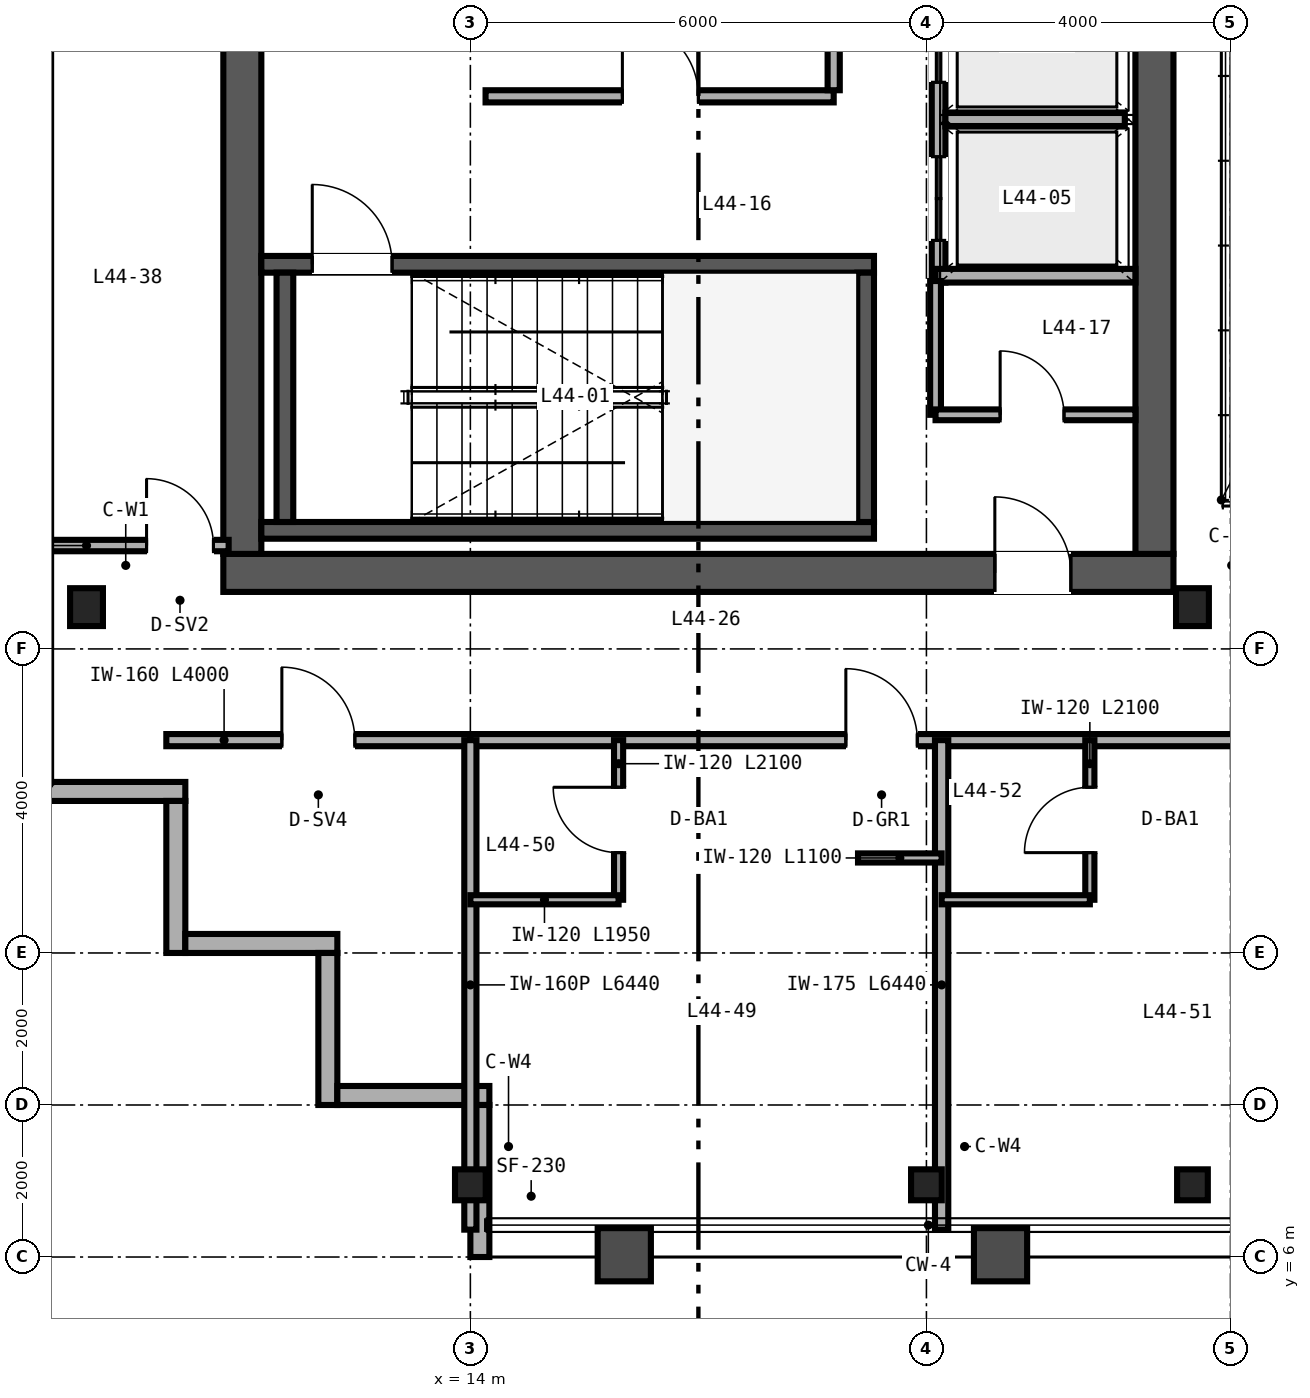
"""IFC4 building model, lengths in metres.
Left out: names, types, materials, properties, quantities, classifications, styles, units other than length and angle.
Written with IfcOpenShell. Run it as: python <this file> out.ifc"""

import sys

from ifc_helpers import new_model, si_unit, direction, frame, frame_2d, origin, origin_2d, place, context, subcontext, project, spatial, rectangle, i_section, extrude, source, transform, mapped, element, fill, save


model = new_model("IFC4")
c1 = context("Model", 3, precision=1e-05, world=origin(), true_north=direction((0.0, 1.0)))
c2 = subcontext(c1, "Body", "Model", "MODEL_VIEW")
j1 = project(units=[si_unit("LENGTHUNIT", "METRE"), si_unit("PLANEANGLEUNIT", "RADIAN")], contexts=[c1])
p1 = place(None, origin())
s1 = spatial("IfcSite", under=j1, at=p1, CompositionType="ELEMENT")
p2 = place(p1, origin())
s2 = spatial("IfcBuilding", under=s1, at=p2, CompositionType="ELEMENT")
p3 = place(p2, frame((0.0, 0.0, 177.6)))
s3 = spatial("IfcBuildingStorey", under=s2, at=p3, CompositionType="ELEMENT", Elevation=177.6)
p4 = place(p3, frame((10.75, 15.0, 0.0), z_axis=(0.0, 0.0, 1.0), x_axis=(1.0, 0.0, 0.0)))
e1 = element("IfcWall", 1, at=p4, inside=s3, PredefinedType="SHEAR", context=c2, shape_type="SweptSolid", body=[
    extrude(rectangle(XDim=12.5, YDim=0.5, at=frame_2d((6.25, 0.0))), origin(), (0.0, 0.0, 1.0), 3.37),
])
p5 = place(p4, frame((10.15, 0.0, 0.0)))
e2 = element("IfcOpeningElement", 2, at=p5, cuts=e1, PredefinedType="OPENING", context=c2, shape_type="SweptSolid", body=[
    extrude(rectangle(XDim=1.0, YDim=2.15, at=frame_2d((0.5, 1.075))), frame((0.0, 0.26, 0.0), z_axis=(0.0, -1.0, 0.0), x_axis=(1.0, 0.0, 0.0)), (0.0, 0.0, 1.0), 0.52),
])
for number, where, z_axis, x_axis in (
    (3, (11.0, 15.25, 0.0), (0.0, 0.0, 1.0), (0.0, 1.0, 0.0)),
    (4, (23.0, 15.25, 0.0), (0.0, 0.0, 1.0), (0.0, 1.0, 0.0)),
):
    element("IfcWall", number, at=place(p3, frame(where, z_axis=z_axis, x_axis=x_axis)), inside=s3, PredefinedType="SHEAR", context=c2, shape_type="SweptSolid", body=[
        extrude(rectangle(XDim=21.5, YDim=0.5, at=frame_2d((10.75, 0.0))), origin(), (0.0, 0.0, 1.0), 3.37),
    ])
p6 = place(p3, frame((11.25, 15.56, 0.0), z_axis=(0.0, 0.0, 1.0), x_axis=(1.0, 0.0, 0.0)))
e5 = element("IfcWall", 5, at=p6, inside=s3, PredefinedType="SHEAR", context=c2, shape_type="SweptSolid", body=[
    extrude(rectangle(XDim=8.06, YDim=0.22, at=frame_2d((4.03, 0.0))), origin(), (0.0, 0.0, 1.0), 3.4),
])
p7 = place(p3, frame((11.25, 19.06, 0.0), z_axis=(0.0, 0.0, 1.0), x_axis=(1.0, 0.0, 0.0)))
e6 = element("IfcWall", 6, at=p7, inside=s3, PredefinedType="SHEAR", context=c2, shape_type="SweptSolid", body=[
    extrude(rectangle(XDim=8.06, YDim=0.22, at=frame_2d((4.03, 0.0))), origin(), (0.0, 0.0, 1.0), 3.4),
])
p8 = place(p7, frame((0.67, 0.0, 0.0)))
e7 = element("IfcOpeningElement", 7, at=p8, cuts=e6, PredefinedType="OPENING", context=c2, shape_type="SweptSolid", body=[
    extrude(rectangle(XDim=1.05, YDim=2.15, at=frame_2d((0.525, 1.075))), frame((0.0, 0.12, 0.0), z_axis=(0.0, -1.0, 0.0), x_axis=(1.0, 0.0, 0.0)), (0.0, 0.0, 1.0), 0.24),
])
for number, where, z_axis, x_axis in (
    (8, (11.56, 15.67, 0.0), (0.0, 0.0, 1.0), (0.0, 1.0, 0.0)),
    (9, (19.2, 15.67, 0.0), (0.0, 0.0, 1.0), (0.0, 1.0, 0.0)),
):
    element("IfcWall", number, at=place(p3, frame(where, z_axis=z_axis, x_axis=x_axis)), inside=s3, PredefinedType="SHEAR", context=c2, shape_type="SweptSolid", body=[
        extrude(rectangle(XDim=3.28, YDim=0.22, at=frame_2d((1.64, 0.0))), origin(), (0.0, 0.0, 1.0), 3.4),
    ])
m1 = source(origin(), c2, "Body", "SweptSolid", [
    extrude(i_section(OverallWidth=0.432, OverallDepth=0.498, WebThickness=0.056, FlangeThickness=0.089, FilletRadius=0.025, at=origin_2d()), origin(), (0.0, 0.0, 1.0), 3.37),
])
for number, where, z_axis, x_axis in (
    (10, (8.95, 14.55, 0.0), (0.0, 0.0, 1.0), (1.0, 0.0, 0.0)),
    (11, (23.5, 14.55, 0.0), (0.0, 0.0, 1.0), (1.0, 0.0, 0.0)),
):
    element("IfcColumn", number, at=place(p3, frame(where, z_axis=z_axis, x_axis=x_axis)), inside=s3, PredefinedType="COLUMN", context=c2, shape_type="MappedRepresentation", body=[
        mapped(m1, transform((0.0, 0.0, 0.0), scale=1.0)),
    ])
m2 = source(origin(), c2, "Body", "SweptSolid", [
    extrude(i_section(OverallWidth=0.404, OverallDepth=0.407, WebThickness=0.027, FlangeThickness=0.044, FilletRadius=0.025, at=origin_2d()), origin(), (0.0, 0.0, 1.0), 3.37),
])
for number, where, z_axis, x_axis in (
    (12, (14.0, 6.95, 0.0), (0.0, 0.0, 1.0), (1.0, 0.0, 0.0)),
    (13, (20.0, 6.95, 0.0), (0.0, 0.0, 1.0), (1.0, 0.0, 0.0)),
    (14, (23.5, 6.95, 0.0), (0.0, 0.0, 1.0), (1.0, 0.0, 0.0)),
):
    element("IfcColumn", number, at=place(p3, frame(where, z_axis=z_axis, x_axis=x_axis)), inside=s3, PredefinedType="COLUMN", context=c2, shape_type="MappedRepresentation", body=[
        mapped(m2, transform((0.0, 0.0, 0.0), scale=1.0)),
    ])
p9 = place(p3, frame((8.0, 12.125, 0.0), z_axis=(0.0, 0.0, 1.0), x_axis=(1.0, 0.0, 0.0)))
e15 = element("IfcWall", 15, at=p9, inside=s3, PredefinedType="SOLIDWALL", context=c2, shape_type="SweptSolid", body=[
    extrude(rectangle(XDim=2.25, YDim=0.25, at=frame_2d((1.125, 0.0))), origin(), (0.0, 0.0, 1.0), 3.37),
])
for number, where, z_axis, x_axis in (
    (16, (10.125, 12.0, 0.0), (0.0, 0.0, 1.0), (0.0, -1.0, 0.0)),
    (17, (10.25, 10.125, 0.0), (0.0, 0.0, 1.0), (1.0, 0.0, 0.0)),
    (18, (12.125, 10.0, 0.0), (0.0, 0.0, 1.0), (0.0, -1.0, 0.0)),
    (19, (12.25, 8.125, 0.0), (0.0, 0.0, 1.0), (1.0, 0.0, 0.0)),
):
    element("IfcWall", number, at=place(p3, frame(where, z_axis=z_axis, x_axis=x_axis)), inside=s3, PredefinedType="SOLIDWALL", context=c2, shape_type="SweptSolid", body=[
        extrude(rectangle(XDim=2.0, YDim=0.25, at=frame_2d((1.0, 0.0))), origin(), (0.0, 0.0, 1.0), 3.37),
    ])
p10 = place(p3, frame((14.125, 8.0, 0.0), z_axis=(0.0, 0.0, 1.0), x_axis=(0.0, -1.0, 0.0)))
e20 = element("IfcWall", 20, at=p10, inside=s3, PredefinedType="SOLIDWALL", context=c2, shape_type="SweptSolid", body=[
    extrude(rectangle(XDim=2.0, YDim=0.25, at=frame_2d((1.0, 0.0))), origin(), (0.0, 0.0, 1.0), 2.677),
])
p11 = place(p3, frame((20.16, 18.82, 0.0), z_axis=(0.0, 0.0, 1.0), x_axis=(0.0, 1.0, 0.0)))
e21 = element("IfcWall", 21, at=p11, inside=s3, PredefinedType="SOLIDWALL", context=c2, shape_type="SweptSolid", body=[
    extrude(rectangle(XDim=6.32, YDim=0.18, at=frame_2d((3.16, 0.0))), origin(), (0.0, 0.0, 1.0), 2.47),
])
p12 = place(p11, frame((0.555, 0.0, 0.0)))
e22 = element("IfcOpeningElement", 22, at=p12, cuts=e21, PredefinedType="OPENING", context=c2, shape_type="SweptSolid", body=[
    extrude(rectangle(XDim=1.1, YDim=2.2, at=frame_2d((0.55, 1.1))), frame((0.0, 0.1, 0.0), z_axis=(0.0, -1.0, 0.0), x_axis=(1.0, 0.0, 0.0)), (0.0, 0.0, 1.0), 0.2),
])
p13 = place(p11, frame((2.635, 0.0, 0.0)))
e23 = element("IfcOpeningElement", 23, at=p13, cuts=e21, PredefinedType="OPENING", context=c2, shape_type="SweptSolid", body=[
    extrude(rectangle(XDim=1.1, YDim=2.2, at=frame_2d((0.55, 1.1))), frame((0.0, 0.1, 0.0), z_axis=(0.0, -1.0, 0.0), x_axis=(1.0, 0.0, 0.0)), (0.0, 0.0, 1.0), 0.2),
])
p14 = place(p11, frame((4.69, 0.0, 0.0)))
e24 = element("IfcOpeningElement", 24, at=p14, cuts=e21, PredefinedType="OPENING", context=c2, shape_type="SweptSolid", body=[
    extrude(rectangle(XDim=1.1, YDim=2.2, at=frame_2d((0.55, 1.1))), frame((0.0, 0.1, 0.0), z_axis=(0.0, -1.0, 0.0), x_axis=(1.0, 0.0, 0.0)), (0.0, 0.0, 1.0), 0.2),
])
p15 = place(p3, frame((20.12, 18.91, 0.0), z_axis=(0.0, 0.0, 1.0), x_axis=(1.0, 0.0, 0.0)))
e25 = element("IfcWall", 25, at=p15, inside=s3, PredefinedType="SOLIDWALL", context=c2, shape_type="SweptSolid", body=[
    extrude(rectangle(XDim=2.63, YDim=0.18, at=frame_2d((1.315, 0.0))), origin(), (0.0, 0.0, 1.0), 3.37),
])
p16 = place(p3, frame((20.25, 20.965, 0.0), z_axis=(0.0, 0.0, 1.0), x_axis=(1.0, 0.0, 0.0)))
e26 = element("IfcWall", 26, at=p16, inside=s3, PredefinedType="SOLIDWALL", context=c2, shape_type="SweptSolid", body=[
    extrude(rectangle(XDim=2.36, YDim=0.18, at=frame_2d((1.18, 0.0))), origin(), (0.0, 0.0, 1.0), 2.47),
])
p17 = place(p3, frame((14.2, 21.27, 0.0), z_axis=(0.0, 0.0, 1.0), x_axis=(1.0, 0.0, 0.0)))
e27 = element("IfcWall", 27, at=p17, inside=s3, PredefinedType="PARTITIONING", context=c2, shape_type="SweptSolid", body=[
    extrude(rectangle(XDim=4.58, YDim=0.16, at=frame_2d((2.29, 0.0))), origin(), (0.0, 0.0, 1.0), 3.37),
])
p18 = place(p17, frame((1.8, 0.0, 0.0)))
e28 = element("IfcOpeningElement", 28, at=p18, cuts=e27, PredefinedType="OPENING", context=c2, shape_type="SweptSolid", body=[
    extrude(rectangle(XDim=1.0, YDim=2.15, at=frame_2d((0.5, 1.075))), frame((0.0, 0.09, 0.0), z_axis=(0.0, -1.0, 0.0), x_axis=(1.0, 0.0, 0.0)), (0.0, 0.0, 1.0), 0.18),
])
p19 = place(p3, frame((18.78, 21.35, 0.0), z_axis=(0.0, 0.0, 1.0), x_axis=(0.0, 1.0, 0.0)))
e29 = element("IfcWall", 29, at=p19, inside=s3, PredefinedType="PARTITIONING", context=c2, shape_type="SweptSolid", body=[
    extrude(rectangle(XDim=3.81, YDim=0.16, at=frame_2d((1.905, 0.0))), origin(), (0.0, 0.0, 1.0), 3.37),
])
p20 = place(p3, frame((20.12, 17.08, 0.0), z_axis=(0.0, 0.0, 1.0), x_axis=(0.0, 1.0, 0.0)))
e30 = element("IfcWall", 30, at=p20, inside=s3, PredefinedType="PARTITIONING", context=c2, shape_type="SweptSolid", body=[
    extrude(rectangle(XDim=1.76, YDim=0.142, at=frame_2d((0.88, 0.0))), origin(), (0.0, 0.0, 1.0), 3.37),
])
p21 = place(p3, frame((20.12, 17.08, 0.0), z_axis=(0.0, 0.0, 1.0), x_axis=(1.0, 0.0, 0.0)))
e31 = element("IfcWall", 31, at=p21, inside=s3, PredefinedType="PARTITIONING", context=c2, shape_type="SweptSolid", body=[
    extrude(rectangle(XDim=2.63, YDim=0.142, at=frame_2d((1.315, 0.0))), origin(), (0.0, 0.0, 1.0), 3.37),
])
p22 = place(p21, frame((0.85, 0.0, 0.0)))
e32 = element("IfcOpeningElement", 32, at=p22, cuts=e31, PredefinedType="OPENING", context=c2, shape_type="SweptSolid", body=[
    extrude(rectangle(XDim=0.84, YDim=2.1, at=frame_2d((0.42, 1.05))), frame((0.0, 0.081, 0.0), z_axis=(0.0, -1.0, 0.0), x_axis=(1.0, 0.0, 0.0)), (0.0, 0.0, 1.0), 0.162),
])
p23 = place(p3, frame((8.16, 15.36, 0.0), z_axis=(0.0, 0.0, 1.0), x_axis=(1.0, 0.0, 0.0)))
e33 = element("IfcWall", 33, at=p23, inside=s3, PredefinedType="PARTITIONING", context=c2, shape_type="SweptSolid", body=[
    extrude(rectangle(XDim=2.66, YDim=0.15, at=frame_2d((1.33, 0.0))), origin(), (0.0, 0.0, 1.0), 2.591),
])
p24 = place(p23, frame((1.58, 0.0, 0.0)))
e34 = element("IfcOpeningElement", 34, at=p24, cuts=e33, PredefinedType="OPENING", context=c2, shape_type="SweptSolid", body=[
    extrude(rectangle(XDim=0.88, YDim=2.15, at=frame_2d((0.44, 1.075))), frame((0.0, 0.085, 0.0), z_axis=(0.0, -1.0, 0.0), x_axis=(1.0, 0.0, 0.0)), (0.0, 0.0, 1.0), 0.17),
])
p25 = place(p3, frame((10.0, 12.8, 0.0), z_axis=(0.0, 0.0, 1.0), x_axis=(1.0, 0.0, 0.0)))
e35 = element("IfcWall", 35, at=p25, inside=s3, PredefinedType="PARTITIONING", context=c2, shape_type="SweptSolid", body=[
    extrude(rectangle(XDim=4.0, YDim=0.16, at=frame_2d((2.0, 0.0))), origin(), (0.0, 0.0, 1.0), 3.37),
])
p26 = place(p25, frame((1.52, 0.0, 0.0)))
e36 = element("IfcOpeningElement", 36, at=p26, cuts=e35, PredefinedType="OPENING", context=c2, shape_type="SweptSolid", body=[
    extrude(rectangle(XDim=0.96, YDim=2.15, at=frame_2d((0.48, 1.075))), frame((0.0, 0.09, 0.0), z_axis=(0.0, -1.0, 0.0), x_axis=(1.0, 0.0, 0.0)), (0.0, 0.0, 1.0), 0.18),
])
p27 = place(p3, frame((14.0, 12.8, 0.0), z_axis=(0.0, 0.0, 1.0), x_axis=(1.0, 0.0, 0.0)))
e37 = element("IfcWall", 37, at=p27, inside=s3, PredefinedType="PARTITIONING", context=c2, shape_type="SweptSolid", body=[
    extrude(rectangle(XDim=12.0, YDim=0.16, at=frame_2d((6.0, 0.0))), origin(), (0.0, 0.0, 1.0), 2.913),
])
p28 = place(p27, frame((4.94, 0.0, 0.0)))
e38 = element("IfcOpeningElement", 38, at=p28, cuts=e37, PredefinedType="OPENING", context=c2, shape_type="SweptSolid", body=[
    extrude(rectangle(XDim=0.94, YDim=2.15, at=frame_2d((0.47, 1.075))), frame((0.0, 0.09, 0.0), z_axis=(0.0, -1.0, 0.0), x_axis=(1.0, 0.0, 0.0)), (0.0, 0.0, 1.0), 0.18),
])
p29 = place(p27, frame((10.74, 0.0, 0.0)))
e39 = element("IfcOpeningElement", 39, at=p29, cuts=e37, PredefinedType="OPENING", context=c2, shape_type="SweptSolid", body=[
    extrude(rectangle(XDim=0.94, YDim=2.15, at=frame_2d((0.47, 1.075))), frame((0.0, 0.09, 0.0), z_axis=(0.0, -1.0, 0.0), x_axis=(1.0, 0.0, 0.0)), (0.0, 0.0, 1.0), 0.18),
])
p30 = place(p3, frame((14.0, 6.36, 0.0), z_axis=(0.0, 0.0, 1.0), x_axis=(0.0, 1.0, 0.0)))
e40 = element("IfcWall", 40, at=p30, inside=s3, PredefinedType="PARTITIONING", context=c2, shape_type="SweptSolid", body=[
    extrude(rectangle(XDim=6.44, YDim=0.16, at=frame_2d((3.22, 0.0))), origin(), (0.0, 0.0, 1.0), 2.677),
])
p31 = place(p3, frame((20.2, 6.36, 0.0), z_axis=(0.0, 0.0, 1.0), x_axis=(0.0, 1.0, 0.0)))
e41 = element("IfcWall", 41, at=p31, inside=s3, PredefinedType="PARTITIONING", context=c2, shape_type="SweptSolid", body=[
    extrude(rectangle(XDim=6.44, YDim=0.175, at=frame_2d((3.22, 0.0))), origin(), (0.0, 0.0, 1.0), 2.677),
])
p32 = place(p3, frame((15.95, 10.7, 0.0), z_axis=(0.0, 0.0, 1.0), x_axis=(0.0, 1.0, 0.0)))
e42 = element("IfcWall", 42, at=p32, inside=s3, PredefinedType="PARTITIONING", context=c2, shape_type="SweptSolid", body=[
    extrude(rectangle(XDim=2.1, YDim=0.12, at=frame_2d((1.05, 0.0))), origin(), (0.0, 0.0, 1.0), 3.37),
])
p33 = place(p32, frame((0.62, 0.0, 0.0)))
e43 = element("IfcOpeningElement", 43, at=p33, cuts=e42, PredefinedType="OPENING", context=c2, shape_type="SweptSolid", body=[
    extrude(rectangle(XDim=0.86, YDim=2.1, at=frame_2d((0.43, 1.05))), frame((0.0, 0.07, 0.0), z_axis=(0.0, -1.0, 0.0), x_axis=(1.0, 0.0, 0.0)), (0.0, 0.0, 1.0), 0.14),
])
p34 = place(p3, frame((14.0, 10.7, 0.0), z_axis=(0.0, 0.0, 1.0), x_axis=(1.0, 0.0, 0.0)))
e44 = element("IfcWall", 44, at=p34, inside=s3, PredefinedType="PARTITIONING", context=c2, shape_type="SweptSolid", body=[
    extrude(rectangle(XDim=1.95, YDim=0.12, at=frame_2d((0.975, 0.0))), origin(), (0.0, 0.0, 1.0), 3.37),
])
p35 = place(p3, frame((19.1, 11.25, 0.0), z_axis=(0.0, 0.0, 1.0), x_axis=(1.0, 0.0, 0.0)))
e45 = element("IfcWall", 45, at=p35, inside=s3, PredefinedType="PARTITIONING", context=c2, shape_type="SweptSolid", body=[
    extrude(rectangle(XDim=1.1, YDim=0.12, at=frame_2d((0.55, 0.0))), origin(), (0.0, 0.0, 1.0), 3.37),
])
p36 = place(p3, frame((22.15, 10.7, 0.0), z_axis=(0.0, 0.0, 1.0), x_axis=(0.0, 1.0, 0.0)))
e46 = element("IfcWall", 46, at=p36, inside=s3, PredefinedType="PARTITIONING", context=c2, shape_type="SweptSolid", body=[
    extrude(rectangle(XDim=2.1, YDim=0.12, at=frame_2d((1.05, 0.0))), origin(), (0.0, 0.0, 1.0), 3.37),
])
p37 = place(p36, frame((0.62, 0.0, 0.0)))
e47 = element("IfcOpeningElement", 47, at=p37, cuts=e46, PredefinedType="OPENING", context=c2, shape_type="SweptSolid", body=[
    extrude(rectangle(XDim=0.86, YDim=2.1, at=frame_2d((0.43, 1.05))), frame((0.0, 0.07, 0.0), z_axis=(0.0, -1.0, 0.0), x_axis=(1.0, 0.0, 0.0)), (0.0, 0.0, 1.0), 0.14),
])
p38 = place(p3, frame((20.2, 10.7, 0.0), z_axis=(0.0, 0.0, 1.0), x_axis=(1.0, 0.0, 0.0)))
e48 = element("IfcWall", 48, at=p38, inside=s3, PredefinedType="PARTITIONING", context=c2, shape_type="SweptSolid", body=[
    extrude(rectangle(XDim=1.95, YDim=0.12, at=frame_2d((0.975, 0.0))), origin(), (0.0, 0.0, 1.0), 3.37),
])
m3 = source(origin(), c2, "Body", "SweptSolid", [
    extrude(rectangle(XDim=1.05, YDim=2.15, at=frame_2d((0.525, 1.075))), frame((0.0, 0.025, 0.0), z_axis=(0.0, -1.0, 0.0), x_axis=(1.0, 0.0, 0.0)), (0.0, 0.0, 1.0), 0.05),
])
p39 = place(p8, origin())
e49 = element("IfcDoor", 49, at=p39, inside=s3, OperationType="SINGLE_SWING_LEFT", PredefinedType="DOOR", context=c2, shape_type="MappedRepresentation", body=[
    mapped(m3, transform((0.0, 0.0, 0.0), scale=1.0)),
])
fill(e7, e49)
m4 = source(origin(), c2, "Body", "SweptSolid", [
    extrude(rectangle(XDim=1.1, YDim=2.2, at=frame_2d((0.55, 1.1))), frame((0.0, 0.025, 0.0), z_axis=(0.0, -1.0, 0.0), x_axis=(1.0, 0.0, 0.0)), (0.0, 0.0, 1.0), 0.05),
])
p40 = place(p12, origin())
e50 = element("IfcDoor", 50, at=p40, inside=s3, OperationType="DOUBLE_DOOR_SLIDING", PredefinedType="DOOR", context=c2, shape_type="MappedRepresentation", body=[
    mapped(m4, transform((0.0, 0.0, 0.0), scale=1.0)),
])
fill(e22, e50)
p41 = place(p13, origin())
e51 = element("IfcDoor", 51, at=p41, inside=s3, OperationType="DOUBLE_DOOR_SLIDING", PredefinedType="DOOR", context=c2, shape_type="MappedRepresentation", body=[
    mapped(m4, transform((0.0, 0.0, 0.0), scale=1.0)),
])
fill(e23, e51)
m5 = source(origin(), c2, "Body", "SweptSolid", [
    extrude(rectangle(XDim=1.0, YDim=2.15, at=frame_2d((0.5, 1.075))), frame((0.0, 0.025, 0.0), z_axis=(0.0, -1.0, 0.0), x_axis=(1.0, 0.0, 0.0)), (0.0, 0.0, 1.0), 0.05),
])
p42 = place(p18, origin())
e52 = element("IfcDoor", 52, at=p42, inside=s3, OperationType="SINGLE_SWING_LEFT", PredefinedType="DOOR", context=c2, shape_type="MappedRepresentation", body=[
    mapped(m5, transform((0.0, 0.0, 0.0), scale=1.0)),
])
fill(e28, e52)
m6 = source(origin(), c2, "Body", "SweptSolid", [
    extrude(rectangle(XDim=0.84, YDim=2.1, at=frame_2d((0.42, 1.05))), frame((0.0, 0.025, 0.0), z_axis=(0.0, -1.0, 0.0), x_axis=(1.0, 0.0, 0.0)), (0.0, 0.0, 1.0), 0.05),
])
p43 = place(p22, origin())
e53 = element("IfcDoor", 53, at=p43, inside=s3, OperationType="SINGLE_SWING_LEFT", PredefinedType="DOOR", context=c2, shape_type="MappedRepresentation", body=[
    mapped(m6, transform((0.0, 0.0, 0.0), scale=1.0)),
])
fill(e32, e53)
p44 = place(p5, origin())
e54 = element("IfcDoor", 54, at=p44, inside=s3, OperationType="SINGLE_SWING_LEFT", PredefinedType="DOOR", context=c2, shape_type="MappedRepresentation", body=[
    mapped(m5, transform((0.0, 0.0, 0.0), scale=1.0)),
])
fill(e2, e54)
m7 = source(origin(), c2, "Body", "SweptSolid", [
    extrude(rectangle(XDim=0.88, YDim=2.15, at=frame_2d((0.44, 1.075))), frame((0.0, 0.025, 0.0), z_axis=(0.0, -1.0, 0.0), x_axis=(1.0, 0.0, 0.0)), (0.0, 0.0, 1.0), 0.05),
])
p45 = place(p24, origin())
e55 = element("IfcDoor", 55, at=p45, inside=s3, OperationType="SINGLE_SWING_LEFT", PredefinedType="DOOR", context=c2, shape_type="MappedRepresentation", body=[
    mapped(m7, transform((0.0, 0.0, 0.0), scale=1.0)),
])
fill(e34, e55)
m8 = source(origin(), c2, "Body", "SweptSolid", [
    extrude(rectangle(XDim=0.96, YDim=2.15, at=frame_2d((0.48, 1.075))), frame((0.0, 0.025, 0.0), z_axis=(0.0, -1.0, 0.0), x_axis=(1.0, 0.0, 0.0)), (0.0, 0.0, 1.0), 0.05),
])
p46 = place(p26, origin())
e56 = element("IfcDoor", 56, at=p46, inside=s3, OperationType="SINGLE_SWING_LEFT", PredefinedType="DOOR", context=c2, shape_type="MappedRepresentation", body=[
    mapped(m8, transform((0.0, 0.0, 0.0), scale=1.0)),
])
fill(e36, e56)
m9 = source(origin(), c2, "Body", "SweptSolid", [
    extrude(rectangle(XDim=0.86, YDim=2.1, at=frame_2d((0.43, 1.05))), frame((0.0, 0.025, 0.0), z_axis=(0.0, -1.0, 0.0), x_axis=(1.0, 0.0, 0.0)), (0.0, 0.0, 1.0), 0.05),
])
p47 = place(p33, origin())
e57 = element("IfcDoor", 57, at=p47, inside=s3, OperationType="SINGLE_SWING_RIGHT", PredefinedType="DOOR", context=c2, shape_type="MappedRepresentation", body=[
    mapped(m9, transform((0.0, 0.0, 0.0), scale=1.0)),
])
fill(e43, e57)
p48 = place(p37, origin())
e58 = element("IfcDoor", 58, at=p48, inside=s3, OperationType="SINGLE_SWING_LEFT", PredefinedType="DOOR", context=c2, shape_type="MappedRepresentation", body=[
    mapped(m9, transform((0.0, 0.0, 0.0), scale=1.0)),
])
fill(e47, e58)
m10 = source(origin(), c2, "Body", "SweptSolid", [
    extrude(rectangle(XDim=0.94, YDim=2.15, at=frame_2d((0.47, 1.075))), frame((0.0, 0.025, 0.0), z_axis=(0.0, -1.0, 0.0), x_axis=(1.0, 0.0, 0.0)), (0.0, 0.0, 1.0), 0.05),
])
p49 = place(p28, origin())
e59 = element("IfcDoor", 59, at=p49, inside=s3, OperationType="SINGLE_SWING_LEFT", PredefinedType="DOOR", context=c2, shape_type="MappedRepresentation", body=[
    mapped(m10, transform((0.0, 0.0, 0.0), scale=1.0)),
])
fill(e38, e59)
save(model, sys.argv[1])
